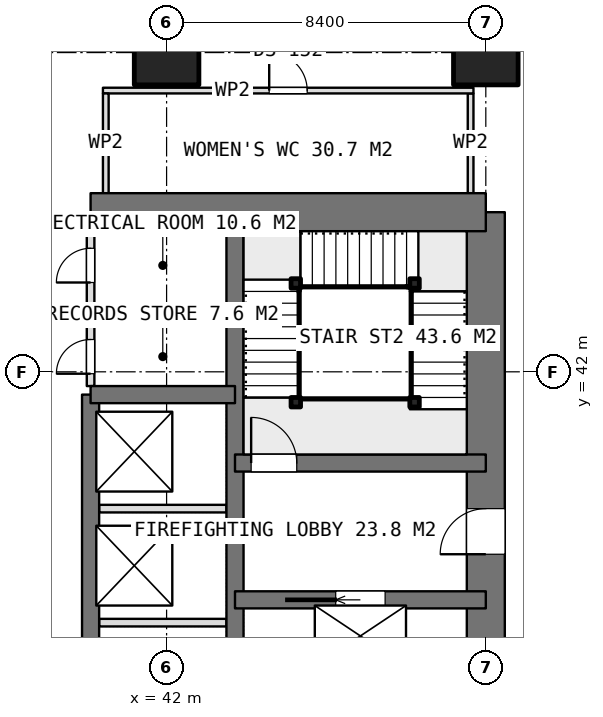
"""IFC4 building model, lengths in metres.
Left out: names, types, materials, properties, quantities, classifications, styles, units other than length and angle.
Written with IfcOpenShell. Run it as: python <this file> out.ifc"""

import sys

from ifc_helpers import new_model, si_unit, direction, frame, frame_2d, origin, origin_2d, place, context, subcontext, project, spatial, rectangle, extrude, element, fill, save


model = new_model("IFC4")
c1 = context("Model", 3, precision=1e-05, world=origin(), true_north=direction((0.0, 1.0)))
c2 = subcontext(c1, "Body", "Model", "MODEL_VIEW")
j1 = project(units=[si_unit("LENGTHUNIT", "METRE"), si_unit("PLANEANGLEUNIT", "RADIAN")], contexts=[c1])
p1 = place(None, origin())
s1 = spatial("IfcSite", under=j1, at=p1, CompositionType="ELEMENT")
p2 = place(p1, origin())
s2 = spatial("IfcBuilding", under=s1, at=p2, CompositionType="ELEMENT")
p3 = place(p2, frame((0.0, 0.0, 140.3)))
s3 = spatial("IfcBuildingStorey", under=s2, at=p3, CompositionType="ELEMENT", Elevation=140.3)
p4 = place(p3, frame((40.0, 46.2, 0.0), z_axis=(0.0, 0.0, 1.0), x_axis=(1.0, 0.0, 0.0)))
e1 = element("IfcWall", 1, at=p4, inside=s3, PredefinedType="SHEAR", context=c2, shape_type="SweptSolid", body=[
    extrude(rectangle(XDim=10.4, YDim=1.0, at=frame_2d((5.2, 0.0))), origin(), (0.0, 0.0, 1.0), 3.75),
])
p5 = place(p3, frame((50.4, 21.0, 0.0), z_axis=(0.0, 0.0, 1.0), x_axis=(0.0, 1.0, 0.0)))
e2 = element("IfcWall", 2, at=p5, inside=s3, PredefinedType="SHEAR", context=c2, shape_type="SweptSolid", body=[
    extrude(rectangle(XDim=25.2, YDim=1.0, at=frame_2d((12.6, 0.0))), origin(), (0.0, 0.0, 1.0), 3.75),
])
p6 = place(p5, frame((16.2, 0.0, 0.0)))
e3 = element("IfcOpeningElement", 3, at=p6, cuts=e2, PredefinedType="OPENING", context=c2, shape_type="SweptSolid", body=[
    extrude(rectangle(XDim=1.2, YDim=2.1, at=frame_2d((0.6, 1.05))), frame((0.0, 0.51, 0.0), z_axis=(0.0, -1.0, 0.0), x_axis=(1.0, 0.0, 0.0)), (0.0, 0.0, 1.0), 1.02),
])
p7 = place(p5, frame((10.05, 0.0, 0.0)))
e4 = element("IfcOpeningElement", 4, at=p7, cuts=e2, PredefinedType="OPENING", context=c2, shape_type="SweptSolid", body=[
    extrude(rectangle(XDim=0.9, YDim=2.1, at=frame_2d((0.45, 1.05))), frame((0.0, 0.51, 0.0), z_axis=(0.0, -1.0, 0.0), x_axis=(1.0, 0.0, 0.0)), (0.0, 0.0, 1.0), 1.02),
])
p8 = place(p5, frame((7.45, 0.0, 0.0)))
e5 = element("IfcOpeningElement", 5, at=p8, cuts=e2, PredefinedType="OPENING", context=c2, shape_type="SweptSolid", body=[
    extrude(rectangle(XDim=0.9, YDim=2.1, at=frame_2d((0.45, 1.05))), frame((0.0, 0.51, 0.0), z_axis=(0.0, -1.0, 0.0), x_axis=(1.0, 0.0, 0.0)), (0.0, 0.0, 1.0), 1.02),
])
p9 = place(p5, frame((0.7, 0.0, 0.0)))
e6 = element("IfcOpeningElement", 6, at=p9, cuts=e2, PredefinedType="OPENING", context=c2, shape_type="SweptSolid", body=[
    extrude(rectangle(XDim=1.2, YDim=2.1, at=frame_2d((0.6, 1.05))), frame((0.0, 0.51, 0.0), z_axis=(0.0, -1.0, 0.0), x_axis=(1.0, 0.0, 0.0)), (0.0, 0.0, 1.0), 1.02),
])
p10 = place(p3, frame((43.8, 21.0, 0.0), z_axis=(0.0, 0.0, 1.0), x_axis=(0.0, 1.0, 0.0)))
e7 = element("IfcWall", 7, at=p10, inside=s3, PredefinedType="SHEAR", context=c2, shape_type="SweptSolid", body=[
    extrude(rectangle(XDim=25.2, YDim=0.45, at=frame_2d((12.6, 0.0))), origin(), (0.0, 0.0, 1.0), 3.75),
])
p11 = place(p3, frame((40.0, 23.4, 0.0), z_axis=(0.0, 0.0, 1.0), x_axis=(0.0, 1.0, 0.0)))
e8 = element("IfcWall", 8, at=p11, inside=s3, PredefinedType="SHEAR", context=c2, shape_type="SweptSolid", body=[
    extrude(rectangle(XDim=18.0, YDim=0.45, at=frame_2d((9.0, 0.0))), origin(), (0.0, 0.0, 1.0), 3.75),
])
p12 = place(p11, frame((0.4, 0.0, 0.0)))
e9 = element("IfcOpeningElement", 9, at=p12, cuts=e8, PredefinedType="OPENING", context=c2, shape_type="SweptSolid", body=[
    extrude(rectangle(XDim=0.9, YDim=2.1, at=frame_2d((0.45, 1.05))), frame((0.0, 0.235, 0.0), z_axis=(0.0, -1.0, 0.0), x_axis=(1.0, 0.0, 0.0)), (0.0, 0.0, 1.0), 0.47),
])
p13 = place(p11, frame((3.35, 0.0, 0.0)))
e10 = element("IfcOpeningElement", 10, at=p13, cuts=e8, PredefinedType="OPENING", context=c2, shape_type="SweptSolid", body=[
    extrude(rectangle(XDim=1.0, YDim=2.1, at=frame_2d((0.5, 1.05))), frame((0.0, 0.235, 0.0), z_axis=(0.0, -1.0, 0.0), x_axis=(1.0, 0.0, 0.0)), (0.0, 0.0, 1.0), 0.47),
])
p14 = place(p3, frame((40.0, 41.4, 0.0), z_axis=(0.0, 0.0, 1.0), x_axis=(1.0, 0.0, 0.0)))
e11 = element("IfcWall", 11, at=p14, inside=s3, PredefinedType="SHEAR", context=c2, shape_type="SweptSolid", body=[
    extrude(rectangle(XDim=3.8, YDim=0.45, at=frame_2d((1.9, 0.0))), origin(), (0.0, 0.0, 1.0), 3.75),
])
p15 = place(p3, frame((43.8, 36.0, 0.0), z_axis=(0.0, 0.0, 1.0), x_axis=(1.0, 0.0, 0.0)))
e12 = element("IfcWall", 12, at=p15, inside=s3, PredefinedType="SHEAR", context=c2, shape_type="SweptSolid", body=[
    extrude(rectangle(XDim=6.6, YDim=0.45, at=frame_2d((3.3, 0.0))), origin(), (0.0, 0.0, 1.0), 3.75),
])
p16 = place(p15, frame((2.65, 0.0, 0.0)))
e13 = element("IfcOpeningElement", 13, at=p16, cuts=e12, PredefinedType="OPENING", context=c2, shape_type="SweptSolid", body=[
    extrude(rectangle(XDim=1.3, YDim=2.1, at=frame_2d((0.65, 1.05))), frame((0.0, 0.235, 0.0), z_axis=(0.0, -1.0, 0.0), x_axis=(1.0, 0.0, 0.0)), (0.0, 0.0, 1.0), 0.47),
])
p17 = place(p3, frame((43.8, 39.6, 0.0), z_axis=(0.0, 0.0, 1.0), x_axis=(1.0, 0.0, 0.0)))
e14 = element("IfcWall", 14, at=p17, inside=s3, PredefinedType="SHEAR", context=c2, shape_type="SweptSolid", body=[
    extrude(rectangle(XDim=6.6, YDim=0.45, at=frame_2d((3.3, 0.0))), origin(), (0.0, 0.0, 1.0), 3.75),
])
p18 = place(p17, frame((0.425, 0.0, 0.0)))
e15 = element("IfcOpeningElement", 15, at=p18, cuts=e14, PredefinedType="OPENING", context=c2, shape_type="SweptSolid", body=[
    extrude(rectangle(XDim=1.2, YDim=2.1, at=frame_2d((0.6, 1.05))), frame((0.0, 0.235, 0.0), z_axis=(0.0, -1.0, 0.0), x_axis=(1.0, 0.0, 0.0)), (0.0, 0.0, 1.0), 0.47),
])
for number, where, z_axis, x_axis in (
    (16, (42.0, 50.4, 0.0), (0.0, 0.0, 1.0), (1.0, 0.0, 0.0)),
    (17, (50.4, 50.4, 0.0), (0.0, 0.0, 1.0), (1.0, 0.0, 0.0)),
):
    element("IfcColumn", number, at=place(p3, frame(where, z_axis=z_axis, x_axis=x_axis)), inside=s3, PredefinedType="COLUMN", context=c2, shape_type="SweptSolid", body=[
        extrude(rectangle(XDim=1.7, YDim=1.7, at=origin_2d()), origin(), (0.0, 0.0, 1.0), 3.75),
    ])
for number, where, z_axis, x_axis in (
    (18, (40.225, 35.4, 0.0), (0.0, 0.0, 1.0), (1.0, 0.0, 0.0)),
    (19, (40.225, 38.4, 0.0), (0.0, 0.0, 1.0), (1.0, 0.0, 0.0)),
):
    element("IfcWall", number, at=place(p3, frame(where, z_axis=z_axis, x_axis=x_axis)), inside=s3, PredefinedType="PARTITIONING", context=c2, shape_type="SweptSolid", body=[
        extrude(rectangle(XDim=3.35, YDim=0.2, at=frame_2d((1.675, 0.0))), origin(), (0.0, 0.0, 1.0), 3.5),
    ])
p19 = place(p3, frame((40.0, 41.625, 0.0), z_axis=(0.0, 0.0, 1.0), x_axis=(0.0, 1.0, 0.0)))
e20 = element("IfcWall", 20, at=p19, inside=s3, PredefinedType="PARTITIONING", context=c2, shape_type="SweptSolid", body=[
    extrude(rectangle(XDim=4.075, YDim=0.2, at=frame_2d((2.038, 0.0))), origin(), (0.0, 0.0, 1.0), 3.5),
])
p20 = place(p19, frame((2.725, 0.0, 0.0)))
e21 = element("IfcOpeningElement", 21, at=p20, cuts=e20, PredefinedType="OPENING", context=c2, shape_type="SweptSolid", body=[
    extrude(rectangle(XDim=0.9, YDim=2.1, at=frame_2d((0.45, 1.05))), frame((0.0, 0.11, 0.0), z_axis=(0.0, -1.0, 0.0), x_axis=(1.0, 0.0, 0.0)), (0.0, 0.0, 1.0), 0.22),
])
p21 = place(p19, frame((0.325, 0.0, 0.0)))
e22 = element("IfcOpeningElement", 22, at=p21, cuts=e20, PredefinedType="OPENING", context=c2, shape_type="SweptSolid", body=[
    extrude(rectangle(XDim=0.9, YDim=2.1, at=frame_2d((0.45, 1.05))), frame((0.0, 0.11, 0.0), z_axis=(0.0, -1.0, 0.0), x_axis=(1.0, 0.0, 0.0)), (0.0, 0.0, 1.0), 0.22),
])
p22 = place(p3, frame((40.0, 43.4, 0.0), z_axis=(0.0, 0.0, 1.0), x_axis=(1.0, 0.0, 0.0)))
e23 = element("IfcWall", 23, at=p22, inside=s3, PredefinedType="PARTITIONING", context=c2, shape_type="SweptSolid", body=[
    extrude(rectangle(XDim=3.575, YDim=0.2, at=frame_2d((1.788, 0.0))), origin(), (0.0, 0.0, 1.0), 3.5),
])
p23 = place(p3, frame((40.325, 49.4, 0.0), z_axis=(0.0, 0.0, 1.0), x_axis=(1.0, 0.0, 0.0)))
e24 = element("IfcWall", 24, at=p23, inside=s3, PredefinedType="PARTITIONING", context=c2, shape_type="SweptSolid", body=[
    extrude(rectangle(XDim=9.75, YDim=0.15, at=frame_2d((4.875, 0.0))), origin(), (0.0, 0.0, 1.0), 3.5),
])
p24 = place(p23, frame((4.375, 0.0, 0.0)))
e25 = element("IfcOpeningElement", 25, at=p24, cuts=e24, PredefinedType="OPENING", context=c2, shape_type="SweptSolid", body=[
    extrude(rectangle(XDim=1.0, YDim=2.1, at=frame_2d((0.5, 1.05))), frame((0.0, 0.085, 0.0), z_axis=(0.0, -1.0, 0.0), x_axis=(1.0, 0.0, 0.0)), (0.0, 0.0, 1.0), 0.17),
])
for number, where, z_axis, x_axis in (
    (26, (40.4, 46.7, 0.0), (0.0, 0.0, 1.0), (0.0, 1.0, 0.0)),
    (27, (50.0, 46.7, 0.0), (0.0, 0.0, 1.0), (0.0, 1.0, 0.0)),
):
    element("IfcWall", number, at=place(p3, frame(where, z_axis=z_axis, x_axis=x_axis)), inside=s3, PredefinedType="PARTITIONING", context=c2, shape_type="SweptSolid", body=[
        extrude(rectangle(XDim=2.625, YDim=0.15, at=frame_2d((1.312, 0.0))), origin(), (0.0, 0.0, 1.0), 3.5),
    ])
for number, where, z_axis, x_axis in (
    (28, (45.4, 41.2, 0.0), (0.0, 0.0, 1.0), (1.0, 0.0, 0.0)),
    (29, (45.4, 44.325, 0.0), (0.0, 0.0, 1.0), (1.0, 0.0, 0.0)),
    (30, (48.525, 44.325, 0.0), (0.0, 0.0, 1.0), (1.0, 0.0, 0.0)),
    (31, (48.525, 41.2, 0.0), (0.0, 0.0, 1.0), (1.0, 0.0, 0.0)),
):
    element("IfcColumn", number, at=place(p3, frame(where, z_axis=z_axis, x_axis=x_axis)), inside=s3, PredefinedType="COLUMN", context=c2, shape_type="SweptSolid", body=[
        extrude(rectangle(XDim=0.25, YDim=0.25, at=origin_2d()), origin(), (0.0, 0.0, 1.0), 3.75),
    ])
p25 = place(p6, origin())
e32 = element("IfcDoor", 32, at=p25, inside=s3, OperationType="SINGLE_SWING_LEFT", PredefinedType="DOOR", context=c2, shape_type="SweptSolid", body=[
    extrude(rectangle(XDim=1.2, YDim=2.1, at=frame_2d((0.6, 1.05))), frame((0.0, 0.025, 0.0), z_axis=(0.0, -1.0, 0.0), x_axis=(1.0, 0.0, 0.0)), (0.0, 0.0, 1.0), 0.05),
])
fill(e3, e32)
p26 = place(p20, origin())
e33 = element("IfcDoor", 33, at=p26, inside=s3, OperationType="SINGLE_SWING_LEFT", PredefinedType="DOOR", context=c2, shape_type="SweptSolid", body=[
    extrude(rectangle(XDim=0.9, YDim=2.1, at=frame_2d((0.45, 1.05))), frame((0.0, 0.025, 0.0), z_axis=(0.0, -1.0, 0.0), x_axis=(1.0, 0.0, 0.0)), (0.0, 0.0, 1.0), 0.05),
])
fill(e21, e33)
p27 = place(p21, origin())
e34 = element("IfcDoor", 34, at=p27, inside=s3, OperationType="SINGLE_SWING_LEFT", PredefinedType="DOOR", context=c2, shape_type="SweptSolid", body=[
    extrude(rectangle(XDim=0.9, YDim=2.1, at=frame_2d((0.45, 1.05))), frame((0.0, 0.025, 0.0), z_axis=(0.0, -1.0, 0.0), x_axis=(1.0, 0.0, 0.0)), (0.0, 0.0, 1.0), 0.05),
])
fill(e22, e34)
p28 = place(p16, origin())
e35 = element("IfcDoor", 35, at=p28, inside=s3, OperationType="SLIDING_TO_LEFT", PredefinedType="USERDEFINED", context=c2, shape_type="SweptSolid", body=[
    extrude(rectangle(XDim=1.3, YDim=2.1, at=frame_2d((0.65, 1.05))), frame((0.0, 0.025, 0.0), z_axis=(0.0, -1.0, 0.0), x_axis=(1.0, 0.0, 0.0)), (0.0, 0.0, 1.0), 0.05),
])
fill(e13, e35)
p29 = place(p24, origin())
e36 = element("IfcDoor", 36, at=p29, inside=s3, OperationType="SINGLE_SWING_LEFT", PredefinedType="DOOR", context=c2, shape_type="SweptSolid", body=[
    extrude(rectangle(XDim=1.0, YDim=2.1, at=frame_2d((0.5, 1.05))), frame((0.0, 0.025, 0.0), z_axis=(0.0, -1.0, 0.0), x_axis=(1.0, 0.0, 0.0)), (0.0, 0.0, 1.0), 0.05),
])
fill(e25, e36)
p30 = place(p18, origin())
e37 = element("IfcDoor", 37, at=p30, inside=s3, OperationType="SINGLE_SWING_RIGHT", PredefinedType="DOOR", context=c2, shape_type="SweptSolid", body=[
    extrude(rectangle(XDim=1.2, YDim=2.1, at=frame_2d((0.6, 1.05))), frame((0.0, 0.025, 0.0), z_axis=(0.0, -1.0, 0.0), x_axis=(1.0, 0.0, 0.0)), (0.0, 0.0, 1.0), 0.05),
])
fill(e15, e37)
save(model, sys.argv[1])
